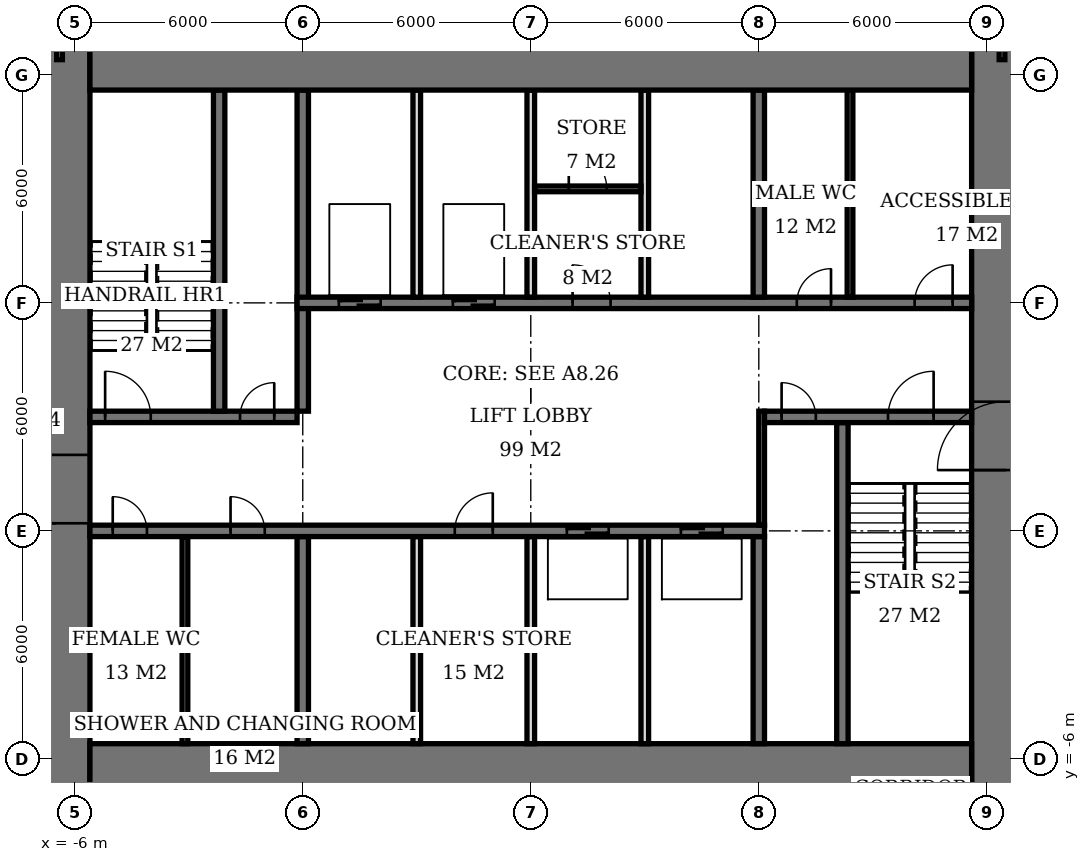
"""IFC4 building model, lengths in metres.
Left out: names, types, materials, properties, quantities, classifications, styles, units other than length and angle.
Written with IfcOpenShell. Run it as: python <this file> out.ifc"""

import sys

from ifc_helpers import new_model, si_unit, direction, frame, frame_2d, origin, place, context, subcontext, project, spatial, rectangle, extrude, element, fill, save


model = new_model("IFC4")
c1 = context("Model", 3, precision=1e-05, world=origin(), true_north=direction((0.0, 1.0)))
c2 = subcontext(c1, "Body", "Model", "MODEL_VIEW")
j1 = project(units=[si_unit("LENGTHUNIT", "METRE"), si_unit("PLANEANGLEUNIT", "RADIAN")], contexts=[c1])
p1 = place(None, origin())
s1 = spatial("IfcSite", under=j1, at=p1, CompositionType="ELEMENT")
p2 = place(p1, origin())
s2 = spatial("IfcBuilding", under=s1, at=p2, CompositionType="ELEMENT")
p3 = place(p2, frame((0.0, 0.0, 185.0)))
s3 = spatial("IfcBuildingStorey", under=s2, at=p3, CompositionType="ELEMENT", Elevation=185.0)
for number, where, z_axis, x_axis in (
    (1, (-5.6, -6.6, 0.0), (0.0, 0.0, 1.0), (1.0, 0.0, 0.0)),
    (2, (-5.6, 12.6, 0.0), (0.0, 0.0, 1.0), (1.0, 0.0, 0.0)),
):
    element("IfcWall", number, at=place(p3, frame(where, z_axis=z_axis, x_axis=x_axis)), inside=s3, PredefinedType="SHEAR", context=c2, shape_type="SweptSolid", body=[
        extrude(rectangle(XDim=23.2, YDim=2.0, at=frame_2d((11.6, 0.0))), origin(), (0.0, 0.0, 1.0), 3.9),
    ])
p4 = place(p3, frame((-6.5, -7.6, 0.0), z_axis=(0.0, 0.0, 1.0), x_axis=(0.0, 1.0, 0.0)))
e3 = element("IfcWall", 3, at=p4, inside=s3, PredefinedType="SHEAR", context=c2, shape_type="SweptSolid", body=[
    extrude(rectangle(XDim=21.2, YDim=1.8, at=frame_2d((10.6, 0.0))), origin(), (0.0, 0.0, 1.0), 3.9),
])
p5 = place(p4, frame((7.8, 0.0, 0.0)))
e4 = element("IfcOpeningElement", 4, at=p5, cuts=e3, PredefinedType="OPENING", context=c2, shape_type="SweptSolid", body=[
    extrude(rectangle(XDim=1.8, YDim=2.4, at=frame_2d((0.9, 1.2))), frame((0.0, 0.91, 0.0), z_axis=(0.0, -1.0, 0.0), x_axis=(1.0, 0.0, 0.0)), (0.0, 0.0, 1.0), 1.82),
])
p6 = place(p3, frame((18.5, -7.6, 0.0), z_axis=(0.0, 0.0, 1.0), x_axis=(0.0, 1.0, 0.0)))
e5 = element("IfcWall", 5, at=p6, inside=s3, PredefinedType="SHEAR", context=c2, shape_type="SweptSolid", body=[
    extrude(rectangle(XDim=21.2, YDim=1.8, at=frame_2d((10.6, 0.0))), origin(), (0.0, 0.0, 1.0), 3.9),
])
p7 = place(p6, frame((9.2, 0.0, 0.0)))
e6 = element("IfcOpeningElement", 6, at=p7, cuts=e5, PredefinedType="OPENING", context=c2, shape_type="SweptSolid", body=[
    extrude(rectangle(XDim=1.8, YDim=2.4, at=frame_2d((0.9, 1.2))), frame((0.0, 0.91, 0.0), z_axis=(0.0, -1.0, 0.0), x_axis=(1.0, 0.0, 0.0)), (0.0, 0.0, 1.0), 1.82),
])
p8 = place(p3, frame((-5.6, 0.0, 0.0), z_axis=(0.0, 0.0, 1.0), x_axis=(1.0, 0.0, 0.0)))
e7 = element("IfcWall", 7, at=p8, inside=s3, PredefinedType="SHEAR", context=c2, shape_type="SweptSolid", body=[
    extrude(rectangle(XDim=17.75, YDim=0.3, at=frame_2d((8.875, 0.0))), origin(), (0.0, 0.0, 1.0), 3.9),
])
p9 = place(p8, frame((0.6, 0.0, 0.0)))
e8 = element("IfcOpeningElement", 8, at=p9, cuts=e7, PredefinedType="OPENING", context=c2, shape_type="SweptSolid", body=[
    extrude(rectangle(XDim=0.9, YDim=2.1, at=frame_2d((0.45, 1.05))), frame((0.0, 0.16, 0.0), z_axis=(0.0, -1.0, 0.0), x_axis=(1.0, 0.0, 0.0)), (0.0, 0.0, 1.0), 0.32),
])
p10 = place(p8, frame((3.7, 0.0, 0.0)))
e9 = element("IfcOpeningElement", 9, at=p10, cuts=e7, PredefinedType="OPENING", context=c2, shape_type="SweptSolid", body=[
    extrude(rectangle(XDim=0.9, YDim=2.1, at=frame_2d((0.45, 1.05))), frame((0.0, 0.16, 0.0), z_axis=(0.0, -1.0, 0.0), x_axis=(1.0, 0.0, 0.0)), (0.0, 0.0, 1.0), 0.32),
])
p11 = place(p8, frame((9.6, 0.0, 0.0)))
e10 = element("IfcOpeningElement", 10, at=p11, cuts=e7, PredefinedType="OPENING", context=c2, shape_type="SweptSolid", body=[
    extrude(rectangle(XDim=1.0, YDim=2.1, at=frame_2d((0.5, 1.05))), frame((0.0, 0.16, 0.0), z_axis=(0.0, -1.0, 0.0), x_axis=(1.0, 0.0, 0.0)), (0.0, 0.0, 1.0), 0.32),
])
p12 = place(p8, frame((12.55, 0.0, 0.0)))
e11 = element("IfcOpeningElement", 11, at=p12, cuts=e7, PredefinedType="OPENING", context=c2, shape_type="SweptSolid", body=[
    extrude(rectangle(XDim=1.1, YDim=2.1, at=frame_2d((0.55, 1.05))), frame((0.0, 0.16, 0.0), z_axis=(0.0, -1.0, 0.0), x_axis=(1.0, 0.0, 0.0)), (0.0, 0.0, 1.0), 0.32),
])
p13 = place(p8, frame((15.55, 0.0, 0.0)))
e12 = element("IfcOpeningElement", 12, at=p13, cuts=e7, PredefinedType="OPENING", context=c2, shape_type="SweptSolid", body=[
    extrude(rectangle(XDim=1.1, YDim=2.1, at=frame_2d((0.55, 1.05))), frame((0.0, 0.16, 0.0), z_axis=(0.0, -1.0, 0.0), x_axis=(1.0, 0.0, 0.0)), (0.0, 0.0, 1.0), 0.32),
])
p14 = place(p3, frame((-5.6, 3.0, 0.0), z_axis=(0.0, 0.0, 1.0), x_axis=(1.0, 0.0, 0.0)))
e13 = element("IfcWall", 13, at=p14, inside=s3, PredefinedType="SHEAR", context=c2, shape_type="SweptSolid", body=[
    extrude(rectangle(XDim=5.45, YDim=0.3, at=frame_2d((2.725, 0.0))), origin(), (0.0, 0.0, 1.0), 3.9),
])
p15 = place(p14, frame((0.4, 0.0, 0.0)))
e14 = element("IfcOpeningElement", 14, at=p15, cuts=e13, PredefinedType="OPENING", context=c2, shape_type="SweptSolid", body=[
    extrude(rectangle(XDim=1.2, YDim=2.1, at=frame_2d((0.6, 1.05))), frame((0.0, 0.16, 0.0), z_axis=(0.0, -1.0, 0.0), x_axis=(1.0, 0.0, 0.0)), (0.0, 0.0, 1.0), 0.32),
])
p16 = place(p14, frame((3.95, 0.0, 0.0)))
e15 = element("IfcOpeningElement", 15, at=p16, cuts=e13, PredefinedType="OPENING", context=c2, shape_type="SweptSolid", body=[
    extrude(rectangle(XDim=0.9, YDim=2.1, at=frame_2d((0.45, 1.05))), frame((0.0, 0.16, 0.0), z_axis=(0.0, -1.0, 0.0), x_axis=(1.0, 0.0, 0.0)), (0.0, 0.0, 1.0), 0.32),
])
p17 = place(p3, frame((12.15, 3.0, 0.0), z_axis=(0.0, 0.0, 1.0), x_axis=(1.0, 0.0, 0.0)))
e16 = element("IfcWall", 16, at=p17, inside=s3, PredefinedType="SHEAR", context=c2, shape_type="SweptSolid", body=[
    extrude(rectangle(XDim=5.45, YDim=0.3, at=frame_2d((2.725, 0.0))), origin(), (0.0, 0.0, 1.0), 3.9),
])
p18 = place(p17, frame((3.25, 0.0, 0.0)))
e17 = element("IfcOpeningElement", 17, at=p18, cuts=e16, PredefinedType="OPENING", context=c2, shape_type="SweptSolid", body=[
    extrude(rectangle(XDim=1.2, YDim=2.1, at=frame_2d((0.6, 1.05))), frame((0.0, 0.16, 0.0), z_axis=(0.0, -1.0, 0.0), x_axis=(1.0, 0.0, 0.0)), (0.0, 0.0, 1.0), 0.32),
])
p19 = place(p17, frame((0.45, 0.0, 0.0)))
e18 = element("IfcOpeningElement", 18, at=p19, cuts=e16, PredefinedType="OPENING", context=c2, shape_type="SweptSolid", body=[
    extrude(rectangle(XDim=0.9, YDim=2.1, at=frame_2d((0.45, 1.05))), frame((0.0, 0.16, 0.0), z_axis=(0.0, -1.0, 0.0), x_axis=(1.0, 0.0, 0.0)), (0.0, 0.0, 1.0), 0.32),
])
p20 = place(p3, frame((-0.15, 6.0, 0.0), z_axis=(0.0, 0.0, 1.0), x_axis=(1.0, 0.0, 0.0)))
e19 = element("IfcWall", 19, at=p20, inside=s3, PredefinedType="SHEAR", context=c2, shape_type="SweptSolid", body=[
    extrude(rectangle(XDim=17.75, YDim=0.3, at=frame_2d((8.875, 0.0))), origin(), (0.0, 0.0, 1.0), 3.9),
])
p21 = place(p20, frame((13.15, 0.0, 0.0)))
e20 = element("IfcOpeningElement", 20, at=p21, cuts=e19, PredefinedType="OPENING", context=c2, shape_type="SweptSolid", body=[
    extrude(rectangle(XDim=0.9, YDim=2.1, at=frame_2d((0.45, 1.05))), frame((0.0, 0.16, 0.0), z_axis=(0.0, -1.0, 0.0), x_axis=(1.0, 0.0, 0.0)), (0.0, 0.0, 1.0), 0.32),
])
p22 = place(p20, frame((16.25, 0.0, 0.0)))
e21 = element("IfcOpeningElement", 21, at=p22, cuts=e19, PredefinedType="OPENING", context=c2, shape_type="SweptSolid", body=[
    extrude(rectangle(XDim=1.0, YDim=2.1, at=frame_2d((0.5, 1.05))), frame((0.0, 0.16, 0.0), z_axis=(0.0, -1.0, 0.0), x_axis=(1.0, 0.0, 0.0)), (0.0, 0.0, 1.0), 0.32),
])
p23 = place(p20, frame((7.25, 0.0, 0.0)))
e22 = element("IfcOpeningElement", 22, at=p23, cuts=e19, PredefinedType="OPENING", context=c2, shape_type="SweptSolid", body=[
    extrude(rectangle(XDim=1.0, YDim=2.1, at=frame_2d((0.5, 1.05))), frame((0.0, 0.16, 0.0), z_axis=(0.0, -1.0, 0.0), x_axis=(1.0, 0.0, 0.0)), (0.0, 0.0, 1.0), 0.32),
])
p24 = place(p20, frame((1.1, 0.0, 0.0)))
e23 = element("IfcOpeningElement", 23, at=p24, cuts=e19, PredefinedType="OPENING", context=c2, shape_type="SweptSolid", body=[
    extrude(rectangle(XDim=1.1, YDim=2.1, at=frame_2d((0.55, 1.05))), frame((0.0, 0.16, 0.0), z_axis=(0.0, -1.0, 0.0), x_axis=(1.0, 0.0, 0.0)), (0.0, 0.0, 1.0), 0.32),
])
p25 = place(p20, frame((4.1, 0.0, 0.0)))
e24 = element("IfcOpeningElement", 24, at=p25, cuts=e19, PredefinedType="OPENING", context=c2, shape_type="SweptSolid", body=[
    extrude(rectangle(XDim=1.1, YDim=2.1, at=frame_2d((0.55, 1.05))), frame((0.0, 0.16, 0.0), z_axis=(0.0, -1.0, 0.0), x_axis=(1.0, 0.0, 0.0)), (0.0, 0.0, 1.0), 0.32),
])
p26 = place(p3, frame((0.0, -5.6, 0.0), z_axis=(0.0, 0.0, 1.0), x_axis=(0.0, 1.0, 0.0)))
e25 = element("IfcWall", 25, at=p26, inside=s3, PredefinedType="SHEAR", context=c2, shape_type="SweptSolid", body=[
    extrude(rectangle(XDim=5.45, YDim=0.3, at=frame_2d((2.725, 0.0))), origin(), (0.0, 0.0, 1.0), 3.9),
])
p27 = place(p3, frame((0.0, 3.15, 0.0), z_axis=(0.0, 0.0, 1.0), x_axis=(0.0, 1.0, 0.0)))
e26 = element("IfcWall", 26, at=p27, inside=s3, PredefinedType="SHEAR", context=c2, shape_type="SweptSolid", body=[
    extrude(rectangle(XDim=8.45, YDim=0.3, at=frame_2d((4.225, 0.0))), origin(), (0.0, 0.0, 1.0), 3.9),
])
for number, where, z_axis, x_axis in (
    (27, (12.0, -5.6, 0.0), (0.0, 0.0, 1.0), (0.0, 1.0, 0.0)),
    (28, (12.0, 6.15, 0.0), (0.0, 0.0, 1.0), (0.0, 1.0, 0.0)),
):
    element("IfcWall", number, at=place(p3, frame(where, z_axis=z_axis, x_axis=x_axis)), inside=s3, PredefinedType="SHEAR", context=c2, shape_type="SweptSolid", body=[
        extrude(rectangle(XDim=5.45, YDim=0.3, at=frame_2d((2.725, 0.0))), origin(), (0.0, 0.0, 1.0), 3.9),
    ])
for number, where, z_axis, x_axis in (
    (29, (-2.2, 3.15, 0.0), (0.0, 0.0, 1.0), (0.0, 1.0, 0.0)),
    (30, (14.2, -5.6, 0.0), (0.0, 0.0, 1.0), (0.0, 1.0, 0.0)),
):
    element("IfcWall", number, at=place(p3, frame(where, z_axis=z_axis, x_axis=x_axis)), inside=s3, PredefinedType="SHEAR", context=c2, shape_type="SweptSolid", body=[
        extrude(rectangle(XDim=8.45, YDim=0.3, at=frame_2d((4.225, 0.0))), origin(), (0.0, 0.0, 1.0), 3.9),
    ])
for number, where, z_axis, x_axis in (
    (31, (3.0, 6.15, 0.0), (0.0, 0.0, 1.0), (0.0, 1.0, 0.0)),
    (32, (6.0, 6.15, 0.0), (0.0, 0.0, 1.0), (0.0, 1.0, 0.0)),
    (33, (9.0, 6.15, 0.0), (0.0, 0.0, 1.0), (0.0, 1.0, 0.0)),
    (34, (3.0, -5.6, 0.0), (0.0, 0.0, 1.0), (0.0, 1.0, 0.0)),
    (35, (6.0, -5.6, 0.0), (0.0, 0.0, 1.0), (0.0, 1.0, 0.0)),
    (36, (9.0, -5.6, 0.0), (0.0, 0.0, 1.0), (0.0, 1.0, 0.0)),
):
    element("IfcWall", number, at=place(p3, frame(where, z_axis=z_axis, x_axis=x_axis)), inside=s3, PredefinedType="SOLIDWALL", context=c2, shape_type="SweptSolid", body=[
        extrude(rectangle(XDim=5.45, YDim=0.2, at=frame_2d((2.725, 0.0))), origin(), (0.0, 0.0, 1.0), 3.9),
    ])
for number, where, z_axis, x_axis in (
    (37, (-3.1, -5.6, 0.0), (0.0, 0.0, 1.0), (0.0, 1.0, 0.0)),
    (38, (14.4, 6.15, 0.0), (0.0, 0.0, 1.0), (0.0, 1.0, 0.0)),
):
    element("IfcWall", number, at=place(p3, frame(where, z_axis=z_axis, x_axis=x_axis)), inside=s3, PredefinedType="PLUMBINGWALL", context=c2, shape_type="SweptSolid", body=[
        extrude(rectangle(XDim=5.45, YDim=0.15, at=frame_2d((2.725, 0.0))), origin(), (0.0, 0.0, 1.0), 3.65),
    ])
p28 = place(p3, frame((6.1, 9.0, 0.0), z_axis=(0.0, 0.0, 1.0), x_axis=(1.0, 0.0, 0.0)))
e39 = element("IfcWall", 39, at=p28, inside=s3, PredefinedType="PARTITIONING", context=c2, shape_type="SweptSolid", body=[
    extrude(rectangle(XDim=2.8, YDim=0.15, at=frame_2d((1.4, 0.0))), origin(), (0.0, 0.0, 1.0), 3.65),
])
p29 = place(p28, frame((0.9, 0.0, 0.0)))
e40 = element("IfcOpeningElement", 40, at=p29, cuts=e39, PredefinedType="OPENING", context=c2, shape_type="SweptSolid", body=[
    extrude(rectangle(XDim=1.0, YDim=2.1, at=frame_2d((0.5, 1.05))), frame((0.0, 0.085, 0.0), z_axis=(0.0, -1.0, 0.0), x_axis=(1.0, 0.0, 0.0)), (0.0, 0.0, 1.0), 0.17),
])
p30 = place(p3, frame((-6.4, 12.4, 0.0), z_axis=(0.0, 0.0, 1.0), x_axis=(0.0, 1.0, 0.0)))
e41 = element("IfcWall", 41, at=p30, inside=s3, PredefinedType="PARTITIONING", context=c2, shape_type="SweptSolid", body=[
    extrude(rectangle(XDim=1.2, YDim=0.15, at=frame_2d((0.6, 0.0))), origin(), (0.0, 0.0, 1.0), 3.65),
])
p31 = place(p3, frame((1.5, 12.4, 0.0), z_axis=(0.0, 0.0, 1.0), x_axis=(0.0, 1.0, 0.0)))
e42 = element("IfcWall", 42, at=p31, inside=s3, PredefinedType="PARTITIONING", context=c2, shape_type="SweptSolid", body=[
    extrude(rectangle(XDim=11.525, YDim=0.15, at=frame_2d((5.763, 0.0))), origin(), (0.0, 0.0, 1.0), 3.65),
])
p32 = place(p3, frame((18.4, 12.4, 0.0), z_axis=(0.0, 0.0, 1.0), x_axis=(0.0, 1.0, 0.0)))
e43 = element("IfcWall", 43, at=p32, inside=s3, PredefinedType="PARTITIONING", context=c2, shape_type="SweptSolid", body=[
    extrude(rectangle(XDim=1.2, YDim=0.15, at=frame_2d((0.6, 0.0))), origin(), (0.0, 0.0, 1.0), 3.65),
])
p33 = place(p3, frame((12.075, 0.15, 0.0), z_axis=(0.0, 0.0, 1.0), x_axis=(0.0, 1.0, 0.0)))
e44 = element("IfcWall", 44, at=p33, inside=s3, PredefinedType="PARTITIONING", context=c2, shape_type="SweptSolid", body=[
    extrude(rectangle(XDim=3.0, YDim=0.15, at=frame_2d((1.5, 0.0))), origin(), (0.0, 0.0, 1.0), 3.65),
])
p34 = place(p5, origin())
e45 = element("IfcDoor", 45, at=p34, inside=s3, OperationType="DOUBLE_DOOR_SINGLE_SWING", PredefinedType="DOOR", context=c2, shape_type="SweptSolid", body=[
    extrude(rectangle(XDim=1.8, YDim=2.4, at=frame_2d((0.9, 1.2))), frame((0.0, 0.025, 0.0), z_axis=(0.0, -1.0, 0.0), x_axis=(1.0, 0.0, 0.0)), (0.0, 0.0, 1.0), 0.05),
])
fill(e4, e45)
p35 = place(p7, origin())
e46 = element("IfcDoor", 46, at=p35, inside=s3, OperationType="DOUBLE_DOOR_SINGLE_SWING", PredefinedType="DOOR", context=c2, shape_type="SweptSolid", body=[
    extrude(rectangle(XDim=1.8, YDim=2.4, at=frame_2d((0.9, 1.2))), frame((0.0, 0.025, 0.0), z_axis=(0.0, -1.0, 0.0), x_axis=(1.0, 0.0, 0.0)), (0.0, 0.0, 1.0), 0.05),
])
fill(e6, e46)
p36 = place(p15, origin())
e47 = element("IfcDoor", 47, at=p36, inside=s3, OperationType="SINGLE_SWING_LEFT", PredefinedType="DOOR", context=c2, shape_type="SweptSolid", body=[
    extrude(rectangle(XDim=1.2, YDim=2.1, at=frame_2d((0.6, 1.05))), frame((0.0, 0.025, 0.0), z_axis=(0.0, -1.0, 0.0), x_axis=(1.0, 0.0, 0.0)), (0.0, 0.0, 1.0), 0.05),
])
fill(e14, e47)
p37 = place(p16, origin())
e48 = element("IfcDoor", 48, at=p37, inside=s3, OperationType="SINGLE_SWING_RIGHT", PredefinedType="DOOR", context=c2, shape_type="SweptSolid", body=[
    extrude(rectangle(XDim=0.9, YDim=2.1, at=frame_2d((0.45, 1.05))), frame((0.0, 0.025, 0.0), z_axis=(0.0, -1.0, 0.0), x_axis=(1.0, 0.0, 0.0)), (0.0, 0.0, 1.0), 0.05),
])
fill(e15, e48)
p38 = place(p18, origin())
e49 = element("IfcDoor", 49, at=p38, inside=s3, OperationType="SINGLE_SWING_RIGHT", PredefinedType="DOOR", context=c2, shape_type="SweptSolid", body=[
    extrude(rectangle(XDim=1.2, YDim=2.1, at=frame_2d((0.6, 1.05))), frame((0.0, 0.025, 0.0), z_axis=(0.0, -1.0, 0.0), x_axis=(1.0, 0.0, 0.0)), (0.0, 0.0, 1.0), 0.05),
])
fill(e17, e49)
p39 = place(p19, origin())
e50 = element("IfcDoor", 50, at=p39, inside=s3, OperationType="SINGLE_SWING_LEFT", PredefinedType="DOOR", context=c2, shape_type="SweptSolid", body=[
    extrude(rectangle(XDim=0.9, YDim=2.1, at=frame_2d((0.45, 1.05))), frame((0.0, 0.025, 0.0), z_axis=(0.0, -1.0, 0.0), x_axis=(1.0, 0.0, 0.0)), (0.0, 0.0, 1.0), 0.05),
])
fill(e18, e50)
p40 = place(p9, origin())
e51 = element("IfcDoor", 51, at=p40, inside=s3, OperationType="SINGLE_SWING_LEFT", PredefinedType="DOOR", context=c2, shape_type="SweptSolid", body=[
    extrude(rectangle(XDim=0.9, YDim=2.1, at=frame_2d((0.45, 1.05))), frame((0.0, 0.025, 0.0), z_axis=(0.0, -1.0, 0.0), x_axis=(1.0, 0.0, 0.0)), (0.0, 0.0, 1.0), 0.05),
])
fill(e8, e51)
p41 = place(p10, origin())
e52 = element("IfcDoor", 52, at=p41, inside=s3, OperationType="SINGLE_SWING_LEFT", PredefinedType="DOOR", context=c2, shape_type="SweptSolid", body=[
    extrude(rectangle(XDim=0.9, YDim=2.1, at=frame_2d((0.45, 1.05))), frame((0.0, 0.025, 0.0), z_axis=(0.0, -1.0, 0.0), x_axis=(1.0, 0.0, 0.0)), (0.0, 0.0, 1.0), 0.05),
])
fill(e9, e52)
p42 = place(p21, origin())
e53 = element("IfcDoor", 53, at=p42, inside=s3, OperationType="SINGLE_SWING_RIGHT", PredefinedType="DOOR", context=c2, shape_type="SweptSolid", body=[
    extrude(rectangle(XDim=0.9, YDim=2.1, at=frame_2d((0.45, 1.05))), frame((0.0, 0.025, 0.0), z_axis=(0.0, -1.0, 0.0), x_axis=(1.0, 0.0, 0.0)), (0.0, 0.0, 1.0), 0.05),
])
fill(e20, e53)
p43 = place(p22, origin())
e54 = element("IfcDoor", 54, at=p43, inside=s3, OperationType="SINGLE_SWING_RIGHT", PredefinedType="DOOR", context=c2, shape_type="SweptSolid", body=[
    extrude(rectangle(XDim=1.0, YDim=2.1, at=frame_2d((0.5, 1.05))), frame((0.0, 0.025, 0.0), z_axis=(0.0, -1.0, 0.0), x_axis=(1.0, 0.0, 0.0)), (0.0, 0.0, 1.0), 0.05),
])
fill(e21, e54)
p44 = place(p29, origin())
e55 = element("IfcDoor", 55, at=p44, inside=s3, OperationType="SINGLE_SWING_LEFT", PredefinedType="DOOR", context=c2, shape_type="SweptSolid", body=[
    extrude(rectangle(XDim=1.0, YDim=2.1, at=frame_2d((0.5, 1.05))), frame((0.0, 0.025, 0.0), z_axis=(0.0, -1.0, 0.0), x_axis=(1.0, 0.0, 0.0)), (0.0, 0.0, 1.0), 0.05),
])
fill(e40, e55)
p45 = place(p23, origin())
e56 = element("IfcDoor", 56, at=p45, inside=s3, OperationType="SINGLE_SWING_LEFT", PredefinedType="DOOR", context=c2, shape_type="SweptSolid", body=[
    extrude(rectangle(XDim=1.0, YDim=2.1, at=frame_2d((0.5, 1.05))), frame((0.0, 0.025, 0.0), z_axis=(0.0, -1.0, 0.0), x_axis=(1.0, 0.0, 0.0)), (0.0, 0.0, 1.0), 0.05),
])
fill(e22, e56)
p46 = place(p11, origin())
e57 = element("IfcDoor", 57, at=p46, inside=s3, OperationType="SINGLE_SWING_RIGHT", PredefinedType="DOOR", context=c2, shape_type="SweptSolid", body=[
    extrude(rectangle(XDim=1.0, YDim=2.1, at=frame_2d((0.5, 1.05))), frame((0.0, 0.025, 0.0), z_axis=(0.0, -1.0, 0.0), x_axis=(1.0, 0.0, 0.0)), (0.0, 0.0, 1.0), 0.05),
])
fill(e10, e57)
p47 = place(p24, origin())
e58 = element("IfcDoor", 58, at=p47, inside=s3, OperationType="DOUBLE_DOOR_SLIDING", PredefinedType="USERDEFINED", context=c2, shape_type="SweptSolid", body=[
    extrude(rectangle(XDim=1.1, YDim=2.1, at=frame_2d((0.55, 1.05))), frame((0.0, 0.025, 0.0), z_axis=(0.0, -1.0, 0.0), x_axis=(1.0, 0.0, 0.0)), (0.0, 0.0, 1.0), 0.05),
])
fill(e23, e58)
p48 = place(p25, origin())
e59 = element("IfcDoor", 59, at=p48, inside=s3, OperationType="DOUBLE_DOOR_SLIDING", PredefinedType="USERDEFINED", context=c2, shape_type="SweptSolid", body=[
    extrude(rectangle(XDim=1.1, YDim=2.1, at=frame_2d((0.55, 1.05))), frame((0.0, 0.025, 0.0), z_axis=(0.0, -1.0, 0.0), x_axis=(1.0, 0.0, 0.0)), (0.0, 0.0, 1.0), 0.05),
])
fill(e24, e59)
p49 = place(p12, origin())
e60 = element("IfcDoor", 60, at=p49, inside=s3, OperationType="DOUBLE_DOOR_SLIDING", PredefinedType="USERDEFINED", context=c2, shape_type="SweptSolid", body=[
    extrude(rectangle(XDim=1.1, YDim=2.1, at=frame_2d((0.55, 1.05))), frame((0.0, 0.025, 0.0), z_axis=(0.0, -1.0, 0.0), x_axis=(1.0, 0.0, 0.0)), (0.0, 0.0, 1.0), 0.05),
])
fill(e11, e60)
p50 = place(p13, origin())
e61 = element("IfcDoor", 61, at=p50, inside=s3, OperationType="DOUBLE_DOOR_SLIDING", PredefinedType="USERDEFINED", context=c2, shape_type="SweptSolid", body=[
    extrude(rectangle(XDim=1.1, YDim=2.1, at=frame_2d((0.55, 1.05))), frame((0.0, 0.025, 0.0), z_axis=(0.0, -1.0, 0.0), x_axis=(1.0, 0.0, 0.0)), (0.0, 0.0, 1.0), 0.05),
])
fill(e12, e61)
save(model, sys.argv[1])
